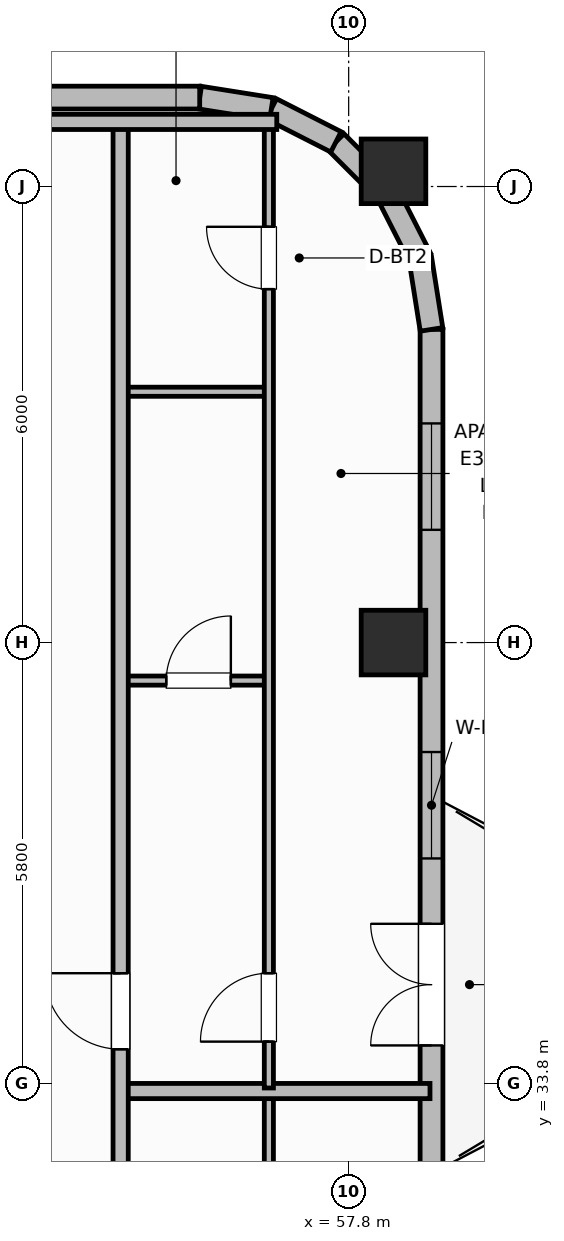
"""IFC4 building model, lengths in metres.
Left out: names, types, materials, properties, quantities, classifications, styles, units other than length and angle.
Written with IfcOpenShell. Run it as: python <this file> out.ifc"""

import sys

from ifc_helpers import new_model, si_unit, direction, frame, frame_2d, origin, origin_2d, place, context, subcontext, project, spatial, rectangle, extrude, element, fill, save


model = new_model("IFC4")
c1 = context("Model", 3, precision=1e-05, world=origin(), true_north=direction((0.0, 1.0)))
c2 = subcontext(c1, "Body", "Model", "MODEL_VIEW")
j1 = project(units=[si_unit("LENGTHUNIT", "METRE"), si_unit("PLANEANGLEUNIT", "RADIAN")], contexts=[c1])
p1 = place(None, origin())
s1 = spatial("IfcSite", under=j1, at=p1, CompositionType="ELEMENT")
p2 = place(p1, origin())
s2 = spatial("IfcBuilding", under=s1, at=p2, CompositionType="ELEMENT")
p3 = place(p2, frame((0.0, 0.0, 240.6)))
s3 = spatial("IfcBuildingStorey", under=s2, at=p3, CompositionType="ELEMENT", Elevation=240.6)
for number, where, z_axis, x_axis in (
    (1, (58.39, 39.6, 0.0), (0.0, 0.0, 1.0), (1.0, 0.0, 0.0)),
    (2, (58.39, 45.8, 0.0), (0.0, 0.0, 1.0), (1.0, 0.0, 0.0)),
):
    element("IfcColumn", number, at=place(p3, frame(where, z_axis=z_axis, x_axis=x_axis)), inside=s3, PredefinedType="COLUMN", context=c2, shape_type="SweptSolid", body=[
        extrude(rectangle(XDim=0.85, YDim=0.85, at=origin_2d()), origin(), (0.0, 0.0, 1.0), 3.7),
    ])
p4 = place(p3, frame((58.89, 32.6, 0.0), z_axis=(0.0, 0.0, 1.0), x_axis=(0.0, 1.0, 0.0)))
e3 = element("IfcWall", 3, at=p4, inside=s3, PredefinedType="SOLIDWALL", context=c2, shape_type="SweptSolid", body=[
    extrude(rectangle(XDim=11.12, YDim=0.3, at=frame_2d((5.56, 0.0))), origin(), (0.0, 0.0, 1.0), 2.73),
])
p5 = place(p4, frame((1.7, 0.0, 0.0)))
e4 = element("IfcOpeningElement", 4, at=p5, cuts=e3, PredefinedType="OPENING", context=c2, shape_type="SweptSolid", body=[
    extrude(rectangle(XDim=1.6, YDim=2.1, at=frame_2d((0.8, 1.05))), frame((0.0, 0.16, 0.0), z_axis=(0.0, -1.0, 0.0), x_axis=(1.0, 0.0, 0.0)), (0.0, 0.0, 1.0), 0.32),
])
p6 = place(p4, frame((4.16, 0.0, 0.76)))
e5 = element("IfcOpeningElement", 5, at=p6, cuts=e3, PredefinedType="OPENING", context=c2, shape_type="SweptSolid", body=[
    extrude(rectangle(XDim=1.4, YDim=1.85, at=frame_2d((0.7, 0.925))), frame((0.0, 0.16, 0.0), z_axis=(0.0, -1.0, 0.0), x_axis=(1.0, 0.0, 0.0)), (0.0, 0.0, 1.0), 0.32),
])
p7 = place(p4, frame((8.483, 0.0, 0.76)))
e6 = element("IfcOpeningElement", 6, at=p7, cuts=e3, PredefinedType="OPENING", context=c2, shape_type="SweptSolid", body=[
    extrude(rectangle(XDim=1.4, YDim=1.85, at=frame_2d((0.7, 0.925))), frame((0.0, 0.16, 0.0), z_axis=(0.0, -1.0, 0.0), x_axis=(1.0, 0.0, 0.0)), (0.0, 0.0, 1.0), 0.32),
])
p8 = place(p3, frame((58.89, 43.72, 0.0), z_axis=(0.0, 0.0, 1.0), x_axis=(-0.156304114255, 0.987708977314, 0.0)))
e7 = element("IfcWall", 7, at=p8, inside=s3, PredefinedType="SOLIDWALL", context=c2, shape_type="SweptSolid", body=[
    extrude(rectangle(XDim=0.954, YDim=0.3, at=frame_2d((0.477, 0.0))), origin(), (0.0, 0.0, 1.0), 2.73),
])
p9 = place(p3, frame((58.741, 44.663, 0.0), z_axis=(0.0, 0.0, 1.0), x_axis=(-0.45395644796, 0.891023873617, 0.0)))
e8 = element("IfcWall", 8, at=p9, inside=s3, PredefinedType="SOLIDWALL", context=c2, shape_type="SweptSolid", body=[
    extrude(rectangle(XDim=0.954, YDim=0.3, at=frame_2d((0.477, 0.0))), origin(), (0.0, 0.0, 1.0), 2.73),
])
for number, where, z_axis, x_axis in (
    (9, (58.308, 45.513, 0.0), (0.0, 0.0, 1.0), (-0.707, 0.707, 0.0)),
    (10, (57.633, 46.188, 0.0), (0.0, 0.0, 1.0), (-0.891, 0.454, 0.0)),
):
    element("IfcWall", number, at=place(p3, frame(where, z_axis=z_axis, x_axis=x_axis)), inside=s3, PredefinedType="SOLIDWALL", context=c2, shape_type="SweptSolid", body=[
        extrude(rectangle(XDim=0.954, YDim=0.3, at=frame_2d((0.477, 0.0))), origin(), (0.0, 0.0, 1.0), 2.73),
    ])
p10 = place(p3, frame((56.782, 46.621, 0.0), z_axis=(0.0, 0.0, 1.0), x_axis=(-0.987663181641, 0.156593229835, 0.0)))
e11 = element("IfcWall", 11, at=p10, inside=s3, PredefinedType="SOLIDWALL", context=c2, shape_type="SweptSolid", body=[
    extrude(rectangle(XDim=0.954, YDim=0.3, at=frame_2d((0.477, 0.0))), origin(), (0.0, 0.0, 1.0), 2.73),
])
p11 = place(p3, frame((55.84, 46.77, 0.0), z_axis=(0.0, 0.0, 1.0), x_axis=(-1.0, 0.0, 0.0)))
e12 = element("IfcWall", 12, at=p11, inside=s3, PredefinedType="SOLIDWALL", context=c2, shape_type="SweptSolid", body=[
    extrude(rectangle(XDim=33.28, YDim=0.3, at=frame_2d((16.64, 0.0))), origin(), (0.0, 0.0, 1.0), 2.73),
])
p12 = place(p11, frame((4.461, 0.0, 0.95)))
e13 = element("IfcOpeningElement", 13, at=p12, cuts=e12, PredefinedType="OPENING", context=c2, shape_type="SweptSolid", body=[
    extrude(rectangle(XDim=1.1, YDim=1.65, at=frame_2d((0.55, 0.825))), frame((0.0, 0.16, 0.0), z_axis=(0.0, -1.0, 0.0), x_axis=(1.0, 0.0, 0.0)), (0.0, 0.0, 1.0), 0.32),
])
p13 = place(p11, frame((7.368, 0.0, 0.95)))
e14 = element("IfcOpeningElement", 14, at=p13, cuts=e12, PredefinedType="OPENING", context=c2, shape_type="SweptSolid", body=[
    extrude(rectangle(XDim=1.1, YDim=1.65, at=frame_2d((0.55, 0.825))), frame((0.0, 0.16, 0.0), z_axis=(0.0, -1.0, 0.0), x_axis=(1.0, 0.0, 0.0)), (0.0, 0.0, 1.0), 0.32),
])
p14 = place(p11, frame((10.275, 0.0, 0.95)))
e15 = element("IfcOpeningElement", 15, at=p14, cuts=e12, PredefinedType="OPENING", context=c2, shape_type="SweptSolid", body=[
    extrude(rectangle(XDim=1.1, YDim=1.65, at=frame_2d((0.55, 0.825))), frame((0.0, 0.16, 0.0), z_axis=(0.0, -1.0, 0.0), x_axis=(1.0, 0.0, 0.0)), (0.0, 0.0, 1.0), 0.32),
])
p15 = place(p11, frame((13.883, 0.0, 0.95)))
e16 = element("IfcOpeningElement", 16, at=p15, cuts=e12, PredefinedType="OPENING", context=c2, shape_type="SweptSolid", body=[
    extrude(rectangle(XDim=1.1, YDim=1.65, at=frame_2d((0.55, 0.825))), frame((0.0, 0.16, 0.0), z_axis=(0.0, -1.0, 0.0), x_axis=(1.0, 0.0, 0.0)), (0.0, 0.0, 1.0), 0.32),
])
p16 = place(p11, frame((16.09, 0.0, 0.95)))
e17 = element("IfcOpeningElement", 17, at=p16, cuts=e12, PredefinedType="OPENING", context=c2, shape_type="SweptSolid", body=[
    extrude(rectangle(XDim=1.1, YDim=1.65, at=frame_2d((0.55, 0.825))), frame((0.0, 0.16, 0.0), z_axis=(0.0, -1.0, 0.0), x_axis=(1.0, 0.0, 0.0)), (0.0, 0.0, 1.0), 0.32),
])
p17 = place(p11, frame((18.297, 0.0, 0.95)))
e18 = element("IfcOpeningElement", 18, at=p17, cuts=e12, PredefinedType="OPENING", context=c2, shape_type="SweptSolid", body=[
    extrude(rectangle(XDim=1.1, YDim=1.65, at=frame_2d((0.55, 0.825))), frame((0.0, 0.16, 0.0), z_axis=(0.0, -1.0, 0.0), x_axis=(1.0, 0.0, 0.0)), (0.0, 0.0, 1.0), 0.32),
])
p18 = place(p11, frame((21.905, 0.0, 0.95)))
e19 = element("IfcOpeningElement", 19, at=p18, cuts=e12, PredefinedType="OPENING", context=c2, shape_type="SweptSolid", body=[
    extrude(rectangle(XDim=1.1, YDim=1.65, at=frame_2d((0.55, 0.825))), frame((0.0, 0.16, 0.0), z_axis=(0.0, -1.0, 0.0), x_axis=(1.0, 0.0, 0.0)), (0.0, 0.0, 1.0), 0.32),
])
p19 = place(p11, frame((24.812, 0.0, 0.95)))
e20 = element("IfcOpeningElement", 20, at=p19, cuts=e12, PredefinedType="OPENING", context=c2, shape_type="SweptSolid", body=[
    extrude(rectangle(XDim=1.1, YDim=1.65, at=frame_2d((0.55, 0.825))), frame((0.0, 0.16, 0.0), z_axis=(0.0, -1.0, 0.0), x_axis=(1.0, 0.0, 0.0)), (0.0, 0.0, 1.0), 0.32),
])
p20 = place(p11, frame((27.719, 0.0, 0.95)))
e21 = element("IfcOpeningElement", 21, at=p20, cuts=e12, PredefinedType="OPENING", context=c2, shape_type="SweptSolid", body=[
    extrude(rectangle(XDim=1.1, YDim=1.65, at=frame_2d((0.55, 0.825))), frame((0.0, 0.16, 0.0), z_axis=(0.0, -1.0, 0.0), x_axis=(1.0, 0.0, 0.0)), (0.0, 0.0, 1.0), 0.32),
])
p21 = place(p3, frame((56.75, 22.4, 0.0), z_axis=(0.0, 0.0, 1.0), x_axis=(0.0, 1.0, 0.0)))
e22 = element("IfcWall", 22, at=p21, inside=s3, PredefinedType="PARTITIONING", context=c2, shape_type="SweptSolid", body=[
    extrude(rectangle(XDim=11.26, YDim=0.12, at=frame_2d((5.63, 0.0))), origin(), (0.0, 0.0, 1.0), 2.56),
])
p22 = place(p21, frame((0.61, 0.0, 0.0)))
e23 = element("IfcOpeningElement", 23, at=p22, cuts=e22, PredefinedType="OPENING", context=c2, shape_type="SweptSolid", body=[
    extrude(rectangle(XDim=0.9, YDim=2.1, at=frame_2d((0.45, 1.05))), frame((0.0, 0.07, 0.0), z_axis=(0.0, -1.0, 0.0), x_axis=(1.0, 0.0, 0.0)), (0.0, 0.0, 1.0), 0.14),
])
p23 = place(p3, frame((54.8, 33.7, 0.0), z_axis=(0.0, 0.0, 1.0), x_axis=(1.0, 0.0, 0.0)))
e24 = element("IfcWall", 24, at=p23, inside=s3, PredefinedType="PARTITIONING", context=c2, shape_type="SweptSolid", body=[
    extrude(rectangle(XDim=4.07, YDim=0.2, at=frame_2d((2.035, 0.0))), origin(), (0.0, 0.0, 1.0), 2.56),
])
p24 = place(p3, frame((54.8, 39.1, 0.0), z_axis=(0.0, 0.0, 1.0), x_axis=(1.0, 0.0, 0.0)))
e25 = element("IfcWall", 25, at=p24, inside=s3, PredefinedType="PARTITIONING", context=c2, shape_type="SweptSolid", body=[
    extrude(rectangle(XDim=1.95, YDim=0.12, at=frame_2d((0.975, 0.0))), origin(), (0.0, 0.0, 1.0), 2.56),
])
p25 = place(p24, frame((0.6, 0.0, 0.0)))
e26 = element("IfcOpeningElement", 26, at=p25, cuts=e25, PredefinedType="OPENING", context=c2, shape_type="SweptSolid", body=[
    extrude(rectangle(XDim=0.85, YDim=2.1, at=frame_2d((0.425, 1.05))), frame((0.0, 0.07, 0.0), z_axis=(0.0, -1.0, 0.0), x_axis=(1.0, 0.0, 0.0)), (0.0, 0.0, 1.0), 0.14),
])
p26 = place(p3, frame((54.8, 42.9, 0.0), z_axis=(0.0, 0.0, 1.0), x_axis=(1.0, 0.0, 0.0)))
e27 = element("IfcWall", 27, at=p26, inside=s3, PredefinedType="PARTITIONING", context=c2, shape_type="SweptSolid", body=[
    extrude(rectangle(XDim=1.95, YDim=0.12, at=frame_2d((0.975, 0.0))), origin(), (0.0, 0.0, 1.0), 2.56),
])
p27 = place(p3, frame((56.75, 33.74, 0.0), z_axis=(0.0, 0.0, 1.0), x_axis=(0.0, 1.0, 0.0)))
e28 = element("IfcWall", 28, at=p27, inside=s3, PredefinedType="PARTITIONING", context=c2, shape_type="SweptSolid", body=[
    extrude(rectangle(XDim=12.67, YDim=0.12, at=frame_2d((6.335, 0.0))), origin(), (0.0, 0.0, 1.0), 2.56),
])
p28 = place(p27, frame((0.61, 0.0, 0.0)))
e29 = element("IfcOpeningElement", 29, at=p28, cuts=e28, PredefinedType="OPENING", context=c2, shape_type="SweptSolid", body=[
    extrude(rectangle(XDim=0.9, YDim=2.1, at=frame_2d((0.45, 1.05))), frame((0.0, 0.07, 0.0), z_axis=(0.0, -1.0, 0.0), x_axis=(1.0, 0.0, 0.0)), (0.0, 0.0, 1.0), 0.14),
])
p29 = place(p27, frame((10.51, 0.0, 0.0)))
e30 = element("IfcOpeningElement", 30, at=p29, cuts=e28, PredefinedType="OPENING", context=c2, shape_type="SweptSolid", body=[
    extrude(rectangle(XDim=0.82, YDim=2.08, at=frame_2d((0.41, 1.04))), frame((0.0, 0.07, 0.0), z_axis=(0.0, -1.0, 0.0), x_axis=(1.0, 0.0, 0.0)), (0.0, 0.0, 1.0), 0.14),
])
p30 = place(p3, frame((54.8, 9.95, 0.0), z_axis=(0.0, 0.0, 1.0), x_axis=(0.0, 1.0, 0.0)))
e31 = element("IfcWall", 31, at=p30, inside=s3, PredefinedType="PARTITIONING", context=c2, shape_type="SweptSolid", body=[
    extrude(rectangle(XDim=36.5, YDim=0.2, at=frame_2d((18.25, 0.0))), origin(), (0.0, 0.0, 1.0), 2.56),
])
p31 = place(p30, frame((3.25, 0.0, 0.0)))
e32 = element("IfcOpeningElement", 32, at=p31, cuts=e31, PredefinedType="OPENING", context=c2, shape_type="SweptSolid", body=[
    extrude(rectangle(XDim=1.0, YDim=2.15, at=frame_2d((0.5, 1.075))), frame((0.0, 0.11, 0.0), z_axis=(0.0, -1.0, 0.0), x_axis=(1.0, 0.0, 0.0)), (0.0, 0.0, 1.0), 0.22),
])
p32 = place(p30, frame((12.96, 0.0, 0.0)))
e33 = element("IfcOpeningElement", 33, at=p32, cuts=e31, PredefinedType="OPENING", context=c2, shape_type="SweptSolid", body=[
    extrude(rectangle(XDim=1.0, YDim=2.15, at=frame_2d((0.5, 1.075))), frame((0.0, 0.11, 0.0), z_axis=(0.0, -1.0, 0.0), x_axis=(1.0, 0.0, 0.0)), (0.0, 0.0, 1.0), 0.22),
])
p33 = place(p30, frame((24.3, 0.0, 0.0)))
e34 = element("IfcOpeningElement", 34, at=p33, cuts=e31, PredefinedType="OPENING", context=c2, shape_type="SweptSolid", body=[
    extrude(rectangle(XDim=1.0, YDim=2.15, at=frame_2d((0.5, 1.075))), frame((0.0, 0.11, 0.0), z_axis=(0.0, -1.0, 0.0), x_axis=(1.0, 0.0, 0.0)), (0.0, 0.0, 1.0), 0.22),
])
p34 = place(p3, frame((53.1, 46.45, 0.0), z_axis=(0.0, 0.0, 1.0), x_axis=(1.0, 0.0, 0.0)))
e35 = element("IfcWall", 35, at=p34, inside=s3, PredefinedType="PARTITIONING", context=c2, shape_type="SweptSolid", body=[
    extrude(rectangle(XDim=3.754, YDim=0.2, at=frame_2d((1.877, 0.0))), origin(), (0.0, 0.0, 1.0), 2.56),
])
p35 = place(p5, origin())
e36 = element("IfcDoor", 36, at=p35, inside=s3, OperationType="DOUBLE_DOOR_SINGLE_SWING", PredefinedType="DOOR", context=c2, shape_type="SweptSolid", body=[
    extrude(rectangle(XDim=1.6, YDim=2.1, at=frame_2d((0.8, 1.05))), frame((0.0, 0.025, 0.0), z_axis=(0.0, -1.0, 0.0), x_axis=(1.0, 0.0, 0.0)), (0.0, 0.0, 1.0), 0.05),
])
fill(e4, e36)
p36 = place(p6, origin())
e37 = element("IfcWindow", 37, at=p36, inside=s3, PartitioningType="SINGLE_PANEL", PredefinedType="WINDOW", context=c2, shape_type="SweptSolid", body=[
    extrude(rectangle(XDim=1.4, YDim=1.85, at=frame_2d((0.7, 0.925))), frame((0.0, 0.03, 0.0), z_axis=(0.0, -1.0, 0.0), x_axis=(1.0, 0.0, 0.0)), (0.0, 0.0, 1.0), 0.06),
])
fill(e5, e37)
p37 = place(p7, origin())
e38 = element("IfcWindow", 38, at=p37, inside=s3, PartitioningType="SINGLE_PANEL", PredefinedType="WINDOW", context=c2, shape_type="SweptSolid", body=[
    extrude(rectangle(XDim=1.4, YDim=1.85, at=frame_2d((0.7, 0.925))), frame((0.0, 0.03, 0.0), z_axis=(0.0, -1.0, 0.0), x_axis=(1.0, 0.0, 0.0)), (0.0, 0.0, 1.0), 0.06),
])
fill(e6, e38)
p38 = place(p25, origin())
e39 = element("IfcDoor", 39, at=p38, inside=s3, OperationType="SINGLE_SWING_RIGHT", PredefinedType="DOOR", context=c2, shape_type="SweptSolid", body=[
    extrude(rectangle(XDim=0.85, YDim=2.1, at=frame_2d((0.425, 1.05))), frame((0.0, 0.025, 0.0), z_axis=(0.0, -1.0, 0.0), x_axis=(1.0, 0.0, 0.0)), (0.0, 0.0, 1.0), 0.05),
])
fill(e26, e39)
p39 = place(p28, origin())
e40 = element("IfcDoor", 40, at=p39, inside=s3, OperationType="SINGLE_SWING_LEFT", PredefinedType="DOOR", context=c2, shape_type="SweptSolid", body=[
    extrude(rectangle(XDim=0.9, YDim=2.1, at=frame_2d((0.45, 1.05))), frame((0.0, 0.025, 0.0), z_axis=(0.0, -1.0, 0.0), x_axis=(1.0, 0.0, 0.0)), (0.0, 0.0, 1.0), 0.05),
])
fill(e29, e40)
p40 = place(p29, origin())
e41 = element("IfcDoor", 41, at=p40, inside=s3, OperationType="SINGLE_SWING_RIGHT", PredefinedType="DOOR", context=c2, shape_type="SweptSolid", body=[
    extrude(rectangle(XDim=0.82, YDim=2.08, at=frame_2d((0.41, 1.04))), frame((0.0, 0.025, 0.0), z_axis=(0.0, -1.0, 0.0), x_axis=(1.0, 0.0, 0.0)), (0.0, 0.0, 1.0), 0.05),
])
fill(e30, e41)
p41 = place(p33, origin())
e42 = element("IfcDoor", 42, at=p41, inside=s3, OperationType="SINGLE_SWING_RIGHT", PredefinedType="DOOR", context=c2, shape_type="SweptSolid", body=[
    extrude(rectangle(XDim=1.0, YDim=2.15, at=frame_2d((0.5, 1.075))), frame((0.0, 0.025, 0.0), z_axis=(0.0, -1.0, 0.0), x_axis=(1.0, 0.0, 0.0)), (0.0, 0.0, 1.0), 0.05),
])
fill(e34, e42)
save(model, sys.argv[1])
